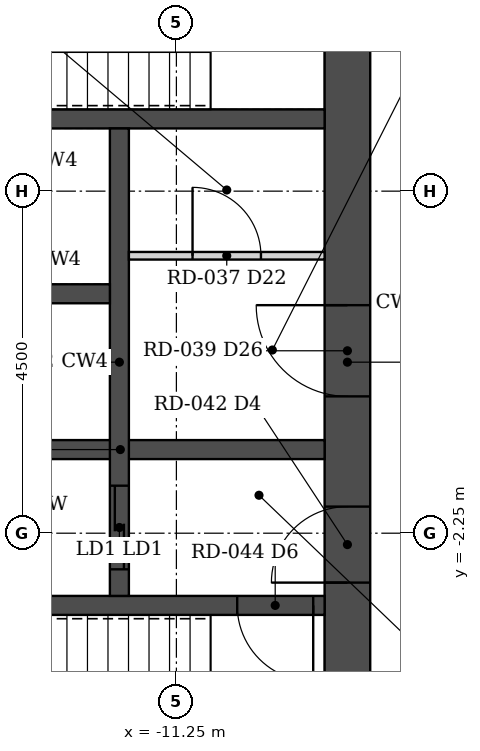
"""IFC4 building model, lengths in metres.
Left out: names, types, materials, properties, quantities, classifications, styles, units other than length and angle.
Written with IfcOpenShell. Run it as: python <this file> out.ifc"""

import sys

from ifc_helpers import new_model, si_unit, direction, frame, frame_2d, origin, place, context, subcontext, project, spatial, rectangle, extrude, element, fill, save


model = new_model("IFC4")
c1 = context("Model", 3, precision=1e-05, world=origin(), true_north=direction((0.0, 1.0)))
c2 = subcontext(c1, "Body", "Model", "MODEL_VIEW")
j1 = project(units=[si_unit("LENGTHUNIT", "METRE"), si_unit("PLANEANGLEUNIT", "RADIAN")], contexts=[c1])
p1 = place(None, origin())
s1 = spatial("IfcSite", under=j1, at=p1, CompositionType="ELEMENT")
p2 = place(p1, origin())
s2 = spatial("IfcBuilding", under=s1, at=p2, CompositionType="ELEMENT")
p3 = place(p2, frame((0.0, 0.0, 58.0)))
s3 = spatial("IfcBuildingStorey", under=s2, at=p3, CompositionType="ELEMENT", Elevation=58.0)
p4 = place(p3, frame((-9.0, -6.45, 0.0), z_axis=(0.0, 0.0, 1.0), x_axis=(0.0, 1.0, 0.0)))
e1 = element("IfcWall", 1, at=p4, inside=s3, PredefinedType="SHEAR", context=c2, shape_type="SweptSolid", body=[
    extrude(rectangle(XDim=12.9, YDim=0.6, at=frame_2d((6.45, 0.0))), origin(), (0.0, 0.0, 1.0), 3.5),
])
p5 = place(p4, frame((3.55, 0.0, 0.0)))
e2 = element("IfcOpeningElement", 2, at=p5, cuts=e1, PredefinedType="OPENING", context=c2, shape_type="SweptSolid", body=[
    extrude(rectangle(XDim=1.0, YDim=2.1, at=frame_2d((0.5, 1.05))), frame((0.0, 0.31, 0.0), z_axis=(0.0, -1.0, 0.0), x_axis=(1.0, 0.0, 0.0)), (0.0, 0.0, 1.0), 0.62),
])
p6 = place(p4, frame((6.0, 0.0, 0.0)))
e3 = element("IfcOpeningElement", 3, at=p6, cuts=e1, PredefinedType="OPENING", context=c2, shape_type="SweptSolid", body=[
    extrude(rectangle(XDim=1.2, YDim=2.1, at=frame_2d((0.6, 1.05))), frame((0.0, 0.31, 0.0), z_axis=(0.0, -1.0, 0.0), x_axis=(1.0, 0.0, 0.0)), (0.0, 0.0, 1.0), 0.62),
])
p7 = place(p4, frame((10.85, 0.0, 0.0)))
e4 = element("IfcOpeningElement", 4, at=p7, cuts=e1, PredefinedType="OPENING", context=c2, shape_type="SweptSolid", body=[
    extrude(rectangle(XDim=1.0, YDim=2.1, at=frame_2d((0.5, 1.05))), frame((0.0, 0.31, 0.0), z_axis=(0.0, -1.0, 0.0), x_axis=(1.0, 0.0, 0.0)), (0.0, 0.0, 1.0), 0.62),
])
p8 = place(p3, frame((-9.3, -3.2, 0.0), z_axis=(0.0, 0.0, 1.0), x_axis=(-1.0, 0.0, 0.0)))
e5 = element("IfcWall", 5, at=p8, inside=s3, PredefinedType="SHEAR", context=c2, shape_type="SweptSolid", body=[
    extrude(rectangle(XDim=8.4, YDim=0.25, at=frame_2d((4.2, 0.0))), origin(), (0.0, 0.0, 1.0), 3.5),
])
p9 = place(p8, frame((0.15, 0.0, 0.0)))
e6 = element("IfcOpeningElement", 6, at=p9, cuts=e5, PredefinedType="OPENING", context=c2, shape_type="SweptSolid", body=[
    extrude(rectangle(XDim=1.0, YDim=2.1, at=frame_2d((0.5, 1.05))), frame((0.0, 0.135, 0.0), z_axis=(0.0, -1.0, 0.0), x_axis=(1.0, 0.0, 0.0)), (0.0, 0.0, 1.0), 0.27),
])
p10 = place(p3, frame((-9.3, 3.2, 0.0), z_axis=(0.0, 0.0, 1.0), x_axis=(-1.0, 0.0, 0.0)))
e7 = element("IfcWall", 7, at=p10, inside=s3, PredefinedType="SHEAR", context=c2, shape_type="SweptSolid", body=[
    extrude(rectangle(XDim=8.4, YDim=0.25, at=frame_2d((4.2, 0.0))), origin(), (0.0, 0.0, 1.0), 3.5),
])
p11 = place(p3, frame((-9.3, -1.15, 0.0), z_axis=(0.0, 0.0, 1.0), x_axis=(-1.0, 0.0, 0.0)))
e8 = element("IfcWall", 8, at=p11, inside=s3, PredefinedType="SHEAR", context=c2, shape_type="SweptSolid", body=[
    extrude(rectangle(XDim=5.375, YDim=0.25, at=frame_2d((2.688, 0.0))), origin(), (0.0, 0.0, 1.0), 3.5),
])
p12 = place(p3, frame((-12.0, -3.075, 0.0), z_axis=(0.0, 0.0, 1.0), x_axis=(0.0, 1.0, 0.0)))
e9 = element("IfcWall", 9, at=p12, inside=s3, PredefinedType="SHEAR", context=c2, shape_type="SweptSolid", body=[
    extrude(rectangle(XDim=6.15, YDim=0.25, at=frame_2d((3.075, 0.0))), origin(), (0.0, 0.0, 1.0), 3.5),
])
p13 = place(p12, frame((0.35, 0.0, 0.0)))
e10 = element("IfcOpeningElement", 10, at=p13, cuts=e9, PredefinedType="OPENING", context=c2, shape_type="SweptSolid", body=[
    extrude(rectangle(XDim=1.1, YDim=2.1, at=frame_2d((0.55, 1.05))), frame((0.0, 0.135, 0.0), z_axis=(0.0, -1.0, 0.0), x_axis=(1.0, 0.0, 0.0)), (0.0, 0.0, 1.0), 0.27),
])
p14 = place(p3, frame((-12.125, 0.9, 0.0), z_axis=(0.0, 0.0, 1.0), x_axis=(-1.0, 0.0, 0.0)))
e11 = element("IfcWall", 11, at=p14, inside=s3, PredefinedType="SHEAR", context=c2, shape_type="SweptSolid", body=[
    extrude(rectangle(XDim=2.55, YDim=0.25, at=frame_2d((1.275, 0.0))), origin(), (0.0, 0.0, 1.0), 3.5),
])
p15 = place(p3, frame((-11.875, 1.4, 0.0), z_axis=(0.0, 0.0, 1.0), x_axis=(1.0, 0.0, 0.0)))
e12 = element("IfcWall", 12, at=p15, inside=s3, PredefinedType="PARTITIONING", context=c2, shape_type="SweptSolid", body=[
    extrude(rectangle(XDim=2.575, YDim=0.1, at=frame_2d((1.288, 0.0))), origin(), (0.0, 0.0, 1.0), 2.373),
])
p16 = place(p15, frame((0.837, 0.0, 0.0)))
e13 = element("IfcOpeningElement", 13, at=p16, cuts=e12, PredefinedType="OPENING", context=c2, shape_type="SweptSolid", body=[
    extrude(rectangle(XDim=0.9, YDim=2.1, at=frame_2d((0.45, 1.05))), frame((0.0, 0.06, 0.0), z_axis=(0.0, -1.0, 0.0), x_axis=(1.0, 0.0, 0.0)), (0.0, 0.0, 1.0), 0.12),
])
p17 = place(p5, origin())
e14 = element("IfcDoor", 14, at=p17, inside=s3, OperationType="SINGLE_SWING_LEFT", PredefinedType="DOOR", context=c2, shape_type="SweptSolid", body=[
    extrude(rectangle(XDim=1.0, YDim=2.1, at=frame_2d((0.5, 1.05))), frame((0.0, 0.025, 0.0), z_axis=(0.0, -1.0, 0.0), x_axis=(1.0, 0.0, 0.0)), (0.0, 0.0, 1.0), 0.05),
])
fill(e2, e14)
p18 = place(p9, origin())
e15 = element("IfcDoor", 15, at=p18, inside=s3, OperationType="SINGLE_SWING_LEFT", PredefinedType="DOOR", context=c2, shape_type="SweptSolid", body=[
    extrude(rectangle(XDim=1.0, YDim=2.1, at=frame_2d((0.5, 1.05))), frame((0.0, 0.025, 0.0), z_axis=(0.0, -1.0, 0.0), x_axis=(1.0, 0.0, 0.0)), (0.0, 0.0, 1.0), 0.05),
])
fill(e6, e15)
p19 = place(p6, origin())
e16 = element("IfcDoor", 16, at=p19, inside=s3, OperationType="SINGLE_SWING_RIGHT", PredefinedType="DOOR", context=c2, shape_type="SweptSolid", body=[
    extrude(rectangle(XDim=1.2, YDim=2.1, at=frame_2d((0.6, 1.05))), frame((0.0, 0.025, 0.0), z_axis=(0.0, -1.0, 0.0), x_axis=(1.0, 0.0, 0.0)), (0.0, 0.0, 1.0), 0.05),
])
fill(e3, e16)
p20 = place(p16, origin())
e17 = element("IfcDoor", 17, at=p20, inside=s3, OperationType="SINGLE_SWING_LEFT", PredefinedType="DOOR", context=c2, shape_type="SweptSolid", body=[
    extrude(rectangle(XDim=0.9, YDim=2.1, at=frame_2d((0.45, 1.05))), frame((0.0, 0.025, 0.0), z_axis=(0.0, -1.0, 0.0), x_axis=(1.0, 0.0, 0.0)), (0.0, 0.0, 1.0), 0.05),
])
fill(e13, e17)
p21 = place(p13, origin())
e18 = element("IfcDoor", 18, at=p21, inside=s3, OperationType="DOUBLE_DOOR_SLIDING", PredefinedType="DOOR", context=c2, shape_type="SweptSolid", body=[
    extrude(rectangle(XDim=1.1, YDim=2.1, at=frame_2d((0.55, 1.05))), frame((0.0, 0.025, 0.0), z_axis=(0.0, -1.0, 0.0), x_axis=(1.0, 0.0, 0.0)), (0.0, 0.0, 1.0), 0.05),
])
fill(e10, e18)
save(model, sys.argv[1])
